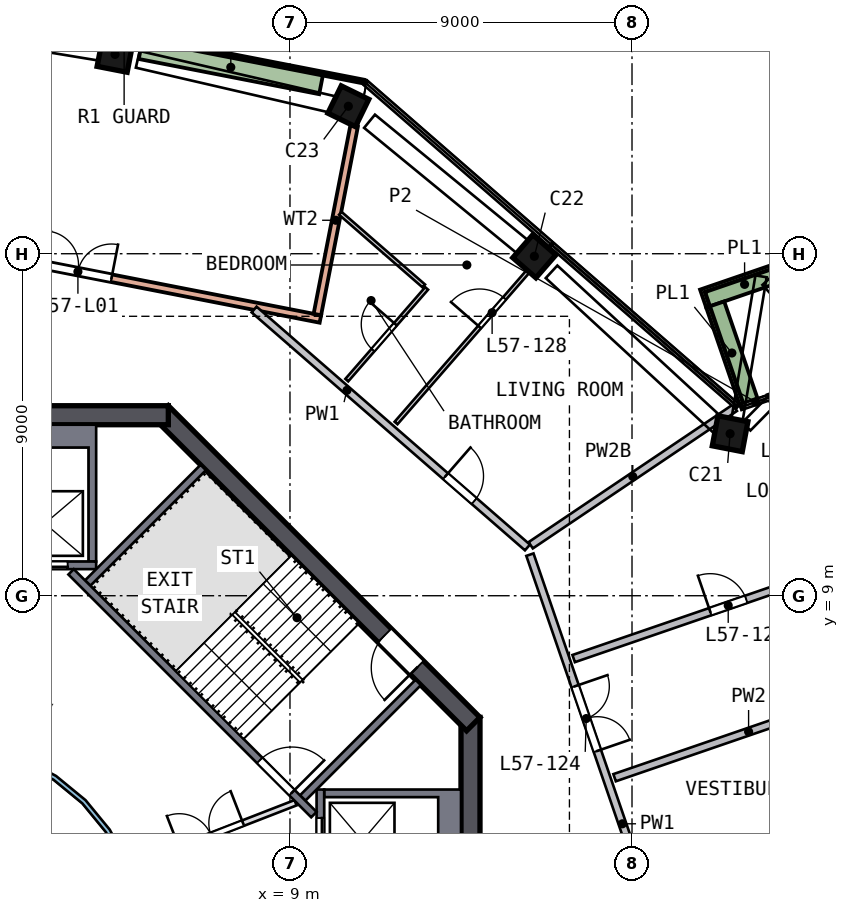
"""IFC4 building model, lengths in metres.
Left out: names, types, materials, properties, quantities, classifications, styles, units other than length and angle.
Written with IfcOpenShell. Run it as: python <this file> out.ifc"""

import sys

from ifc_helpers import new_model, si_unit, direction, frame, frame_2d, origin, origin_2d, place, context, subcontext, project, spatial, polyline, rectangle, outline, extrude, element, fill, save


model = new_model("IFC4")
c1 = context("Model", 3, precision=1e-05, world=origin(), true_north=direction((0.0, 1.0)))
c2 = subcontext(c1, "Body", "Model", "MODEL_VIEW")
j1 = project(units=[si_unit("LENGTHUNIT", "METRE"), si_unit("PLANEANGLEUNIT", "RADIAN")], contexts=[c1])
p1 = place(None, origin())
s1 = spatial("IfcSite", under=j1, at=p1, CompositionType="ELEMENT")
p2 = place(p1, origin())
s2 = spatial("IfcBuilding", under=s1, at=p2, CompositionType="ELEMENT")
p3 = place(p2, frame((0.0, 0.0, 234.0)))
s3 = spatial("IfcBuildingStorey", under=s2, at=p3, CompositionType="ELEMENT", Elevation=234.0)
p4 = place(p3, frame((20.658, 13.145, 0.0), z_axis=(-0.063244127, 0.09767873, 0.993206447), x_axis=(0.979494309, -0.184676163, 0.080533303)))
e1 = element("IfcColumn", 1, at=p4, inside=s3, PredefinedType="COLUMN", context=c2, shape_type="SweptSolid", body=[
    extrude(rectangle(XDim=0.8, YDim=0.8, at=origin_2d()), origin(), (0.0, 0.0, 1.0), 3.212),
])
p5 = place(p3, frame((15.534, 17.844, 0.0), z_axis=(-0.085478103, 0.073234353, 0.993644918), x_axis=(-0.749060992, 0.652869631, -0.112556101)))
e2 = element("IfcColumn", 2, at=p5, inside=s3, PredefinedType="COLUMN", context=c2, shape_type="SweptSolid", body=[
    extrude(rectangle(XDim=0.8, YDim=0.8, at=origin_2d()), origin(), (0.0, 0.0, 1.0), 3.21),
])
p6 = place(p3, frame((10.662, 21.821, 0.0), z_axis=(-0.104226063, 0.049870385, 0.993302508), x_axis=(0.892342905, -0.436319792, 0.115538643)))
e3 = element("IfcColumn", 3, at=p6, inside=s3, PredefinedType="COLUMN", context=c2, shape_type="SweptSolid", body=[
    extrude(rectangle(XDim=0.8, YDim=0.8, at=origin_2d()), origin(), (0.0, 0.0, 1.0), 3.211),
])
p7 = place(p3, frame((4.531, 23.22, 0.0), z_axis=(-0.110650124, 0.020609061, 0.99364572), x_axis=(-0.975267855, 0.190224415, -0.112549024)))
e4 = element("IfcColumn", 4, at=p7, inside=s3, PredefinedType="COLUMN", context=c2, shape_type="SweptSolid", body=[
    extrude(rectangle(XDim=0.8, YDim=0.8, at=origin_2d()), origin(), (0.0, 0.0, 1.0), 3.21),
])
p8 = place(p3, frame((13.75, -5.799, 0.0), z_axis=(0.0, 0.0, 1.0), x_axis=(0.0, 1.0, 0.0)))
e5 = element("IfcWall", 5, at=p8, inside=s3, PredefinedType="SHEAR", context=c2, shape_type="SweptSolid", body=[
    extrude(rectangle(XDim=11.598, YDim=0.5, at=frame_2d((5.799, 0.0))), origin(), (0.0, 0.0, 1.0), 3.5),
])
p9 = place(p8, frame((4.899, 0.0, 0.0)))
e6 = element("IfcOpeningElement", 6, at=p9, cuts=e5, PredefinedType="OPENING", context=c2, shape_type="SweptSolid", body=[
    extrude(rectangle(XDim=1.8, YDim=2.1, at=frame_2d((0.9, 1.05))), frame((0.0, 0.26, 0.0), z_axis=(0.0, -1.0, 0.0), x_axis=(1.0, 0.0, 0.0)), (0.0, 0.0, 1.0), 0.52),
])
p10 = place(p3, frame((13.823, 5.622, 0.0), z_axis=(0.0, 0.0, 1.0), x_axis=(-0.707106781, 0.707106781, 0.0)))
e7 = element("IfcWall", 7, at=p10, inside=s3, PredefinedType="SHEAR", context=c2, shape_type="SweptSolid", body=[
    extrude(rectangle(XDim=11.598, YDim=0.5, at=frame_2d((5.799, 0.0))), origin(), (0.0, 0.0, 1.0), 3.5),
])
p11 = place(p10, frame((2.099, 0.0, 0.0)))
e8 = element("IfcOpeningElement", 8, at=p11, cuts=e7, PredefinedType="OPENING", context=c2, shape_type="SweptSolid", body=[
    extrude(rectangle(XDim=1.2, YDim=2.1, at=frame_2d((0.6, 1.05))), frame((0.0, 0.26, 0.0), z_axis=(0.0, -1.0, 0.0), x_axis=(1.0, 0.0, 0.0)), (0.0, 0.0, 1.0), 0.52),
])
p12 = place(p3, frame((5.799, 13.75, 0.0), z_axis=(0.0, 0.0, 1.0), x_axis=(-1.0, 0.0, 0.0)))
e9 = element("IfcWall", 9, at=p12, inside=s3, PredefinedType="SHEAR", context=c2, shape_type="SweptSolid", body=[
    extrude(rectangle(XDim=11.598, YDim=0.5, at=frame_2d((5.799, 0.0))), origin(), (0.0, 0.0, 1.0), 3.5),
])
p13 = place(p12, frame((4.899, 0.0, 0.0)))
e10 = element("IfcOpeningElement", 10, at=p13, cuts=e9, PredefinedType="OPENING", context=c2, shape_type="SweptSolid", body=[
    extrude(rectangle(XDim=1.8, YDim=2.1, at=frame_2d((0.9, 1.05))), frame((0.0, 0.26, 0.0), z_axis=(0.0, -1.0, 0.0), x_axis=(1.0, 0.0, 0.0)), (0.0, 0.0, 1.0), 0.52),
])
p14 = place(p3, frame((23.301, 14.799, 0.0), z_axis=(0.0, 0.0, 1.0), x_axis=(-0.945712659, -0.325003949, 0.0)))
e11 = element("IfcWall", 11, at=p14, inside=s3, PredefinedType="SOLIDWALL", context=c2, shape_type="SweptSolid", body=[
    extrude(rectangle(XDim=1.8, YDim=0.15, at=frame_2d((0.9, 0.0))), origin(), (0.0, 0.0, 1.0), 2.525),
])
p15 = place(p14, frame((0.4, 0.0, 0.0)))
e12 = element("IfcOpeningElement", 12, at=p15, cuts=e11, PredefinedType="OPENING", context=c2, shape_type="SweptSolid", body=[
    extrude(rectangle(XDim=1.0, YDim=2.4, at=frame_2d((0.5, 1.2))), frame((0.0, 0.085, 0.0), z_axis=(0.0, -1.0, 0.0), x_axis=(1.0, 0.0, 0.0)), (0.0, 0.0, 1.0), 0.17),
])
p16 = place(p3, frame((22.053, 17.568, 0.0), z_axis=(0.0, 0.0, 1.0), x_axis=(-0.945764873, -0.324851975, 0.0)))
e13 = element("IfcWall", 13, at=p16, inside=s3, PredefinedType="SOLIDWALL", context=c2, shape_type="SweptSolid", body=[
    extrude(rectangle(XDim=2.306, YDim=0.5, at=frame_2d((1.153, 0.0))), origin(), (0.0, 0.0, 1.0), 0.7),
])
p17 = place(p3, frame((20.189, 16.664, 0.0), z_axis=(0.0, 0.0, 1.0), x_axis=(0.324925551, -0.945739598, 0.0)))
e14 = element("IfcWall", 14, at=p17, inside=s3, PredefinedType="SOLIDWALL", context=c2, shape_type="SweptSolid", body=[
    extrude(rectangle(XDim=2.699, YDim=0.5, at=frame_2d((1.35, 0.0))), origin(), (0.0, 0.0, 1.0), 0.7),
])
p18 = place(p3, frame((-2.96, 18.772, 0.0), z_axis=(0.0, 0.0, 1.0), x_axis=(0.981496446, -0.191480354, 0.0)))
e15 = element("IfcWall", 15, at=p18, inside=s3, PredefinedType="SOLIDWALL", context=c2, shape_type="SweptSolid", body=[
    extrude(rectangle(XDim=13.0, YDim=0.2, at=frame_2d((6.5, 0.0))), origin(), (0.0, 0.0, 1.0), 3.19),
])
p19 = place(p18, frame((5.6, 0.0, 0.0)))
e16 = element("IfcOpeningElement", 16, at=p19, cuts=e15, PredefinedType="OPENING", context=c2, shape_type="SweptSolid", body=[
    extrude(rectangle(XDim=1.8, YDim=2.4, at=frame_2d((0.9, 1.2))), frame((0.0, 0.11, 0.0), z_axis=(0.0, -1.0, 0.0), x_axis=(1.0, 0.0, 0.0)), (0.0, 0.0, 1.0), 0.22),
])
p20 = place(p3, frame((10.688, 21.361, 0.0), z_axis=(0.0, 0.0, 1.0), x_axis=(-0.191496739, -0.98149325, 0.0)))
e17 = element("IfcWall", 17, at=p20, inside=s3, PredefinedType="SOLIDWALL", context=c2, shape_type="SweptSolid", body=[
    extrude(rectangle(XDim=5.054, YDim=0.2, at=frame_2d((2.527, 0.0))), origin(), (0.0, 0.0, 1.0), 3.19),
])
p21 = place(p3, frame((10.937, 22.531, 0.0), z_axis=(0.0, 0.0, 1.0), x_axis=(-0.981494863, 0.191488469, 0.0)))
e18 = element("IfcWall", 18, at=p21, inside=s3, PredefinedType="SOLIDWALL", context=c2, shape_type="SweptSolid", body=[
    extrude(rectangle(XDim=12.84, YDim=0.1, at=frame_2d((6.42, 0.0))), origin(), (0.0, 0.0, 1.0), 0.7),
])
p22 = place(p3, frame((9.816, 22.444, 0.0), z_axis=(0.0, 0.0, 1.0), x_axis=(-0.981490129, 0.191512731, 0.0)))
e19 = element("IfcWall", 19, at=p22, inside=s3, PredefinedType="SOLIDWALL", context=c2, shape_type="SweptSolid", body=[
    extrude(rectangle(XDim=4.837, YDim=0.5, at=frame_2d((2.418, 0.0))), origin(), (0.0, 0.0, 1.0), 0.7),
])
p23 = place(p3, origin())
e20 = element("IfcWall", 20, at=p23, inside=s3, PredefinedType="SOLIDWALL", context=c2, shape_type="SweptSolid", body=[
    extrude(outline(polyline([(13.5, 3.9), (13.5, 1.2), (9.9, 1.2), (9.9, 1.4), (12.9, 1.4), (12.9, 3.7), (9.9, 3.7), (9.9, 3.9), (13.5, 3.9)])), origin(), (0.0, 0.0, 1.0), 3.19),
])
p24 = place(p3, frame((9.8, 1.2, 0.0), z_axis=(0.0, 0.0, 1.0), x_axis=(0.0, 1.0, 0.0)))
e21 = element("IfcWall", 21, at=p24, inside=s3, PredefinedType="SOLIDWALL", context=c2, shape_type="SweptSolid", body=[
    extrude(rectangle(XDim=2.7, YDim=0.2, at=frame_2d((1.35, 0.0))), origin(), (0.0, 0.0, 1.0), 3.19),
])
p25 = place(p24, frame((0.75, 0.0, 0.0)))
e22 = element("IfcOpeningElement", 22, at=p25, cuts=e21, PredefinedType="OPENING", context=c2, shape_type="SweptSolid", body=[
    extrude(rectangle(XDim=1.2, YDim=2.1, at=frame_2d((0.6, 1.05))), frame((0.0, 0.11, 0.0), z_axis=(0.0, -1.0, 0.0), x_axis=(1.0, 0.0, 0.0)), (0.0, 0.0, 1.0), 0.22),
])
p26 = place(p3, origin())
e23 = element("IfcWall", 23, at=p26, inside=s3, PredefinedType="SOLIDWALL", context=c2, shape_type="SweptSolid", body=[
    extrude(outline(polyline([(3.9, 9.9), (3.7, 9.9), (3.7, 12.9), (1.4, 12.9), (1.4, 9.9), (1.2, 9.9), (1.2, 13.5), (3.9, 13.5), (3.9, 9.9)])), origin(), (0.0, 0.0, 1.0), 3.19),
])
p27 = place(p3, frame((1.2, 9.8, 0.0), z_axis=(0.0, 0.0, 1.0), x_axis=(1.0, 0.0, 0.0)))
e24 = element("IfcWall", 24, at=p27, inside=s3, PredefinedType="SOLIDWALL", context=c2, shape_type="SweptSolid", body=[
    extrude(rectangle(XDim=2.7, YDim=0.2, at=frame_2d((1.35, 0.0))), origin(), (0.0, 0.0, 1.0), 3.19),
])
p28 = place(p27, frame((0.75, 0.0, 0.0)))
e25 = element("IfcOpeningElement", 25, at=p28, cuts=e24, PredefinedType="OPENING", context=c2, shape_type="SweptSolid", body=[
    extrude(rectangle(XDim=1.2, YDim=2.1, at=frame_2d((0.6, 1.05))), frame((0.0, 0.11, 0.0), z_axis=(0.0, -1.0, 0.0), x_axis=(1.0, 0.0, 0.0)), (0.0, 0.0, 1.0), 0.22),
])
p29 = place(p3, frame((3.24, 9.629, 0.0), z_axis=(0.0, 0.0, 1.0), x_axis=(0.707106781, -0.707106781, 0.0)))
e26 = element("IfcWall", 26, at=p29, inside=s3, PredefinedType="SOLIDWALL", context=c2, shape_type="SweptSolid", body=[
    extrude(rectangle(XDim=9.036, YDim=0.2, at=frame_2d((4.518, 0.0))), origin(), (0.0, 0.0, 1.0), 3.19),
])
p30 = place(p29, frame((7.018, 0.0, 0.0)))
e27 = element("IfcOpeningElement", 27, at=p30, cuts=e26, PredefinedType="OPENING", context=c2, shape_type="SweptSolid", body=[
    extrude(rectangle(XDim=1.2, YDim=2.1, at=frame_2d((0.6, 1.05))), frame((0.0, 0.11, 0.0), z_axis=(0.0, -1.0, 0.0), x_axis=(1.0, 0.0, 0.0)), (0.0, 0.0, 1.0), 0.22),
])
for number, where, z_axis, x_axis in (
    (28, (9.334, 3.677, 0.0), (0.0, 0.0, 1.0), (0.707, 0.707, 0.0)),
    (29, (3.677, 9.334, 0.0), (0.0, 0.0, 1.0), (0.707, 0.707, 0.0)),
):
    element("IfcWall", number, at=place(p3, frame(where, z_axis=z_axis, x_axis=x_axis)), inside=s3, PredefinedType="SOLIDWALL", context=c2, shape_type="SweptSolid", body=[
        extrude(rectangle(XDim=4.3, YDim=0.2, at=frame_2d((2.15, 0.0))), origin(), (0.0, 0.0, 1.0), 3.19),
    ])
p31 = place(p3, frame((4.782, 1.857, 0.0), z_axis=(0.0, 0.0, 1.0), x_axis=(0.932155279, 0.362058746, 0.0)))
e30 = element("IfcWall", 30, at=p31, inside=s3, PredefinedType="PARTITIONING", context=c2, shape_type="SweptSolid", body=[
    extrude(rectangle(XDim=4.682, YDim=0.15, at=frame_2d((2.341, 0.0))), origin(), (0.0, 0.0, 1.0), 3.19),
])
p32 = place(p31, frame((1.4, 0.0, 0.0)))
e31 = element("IfcOpeningElement", 31, at=p32, cuts=e30, PredefinedType="OPENING", context=c2, shape_type="SweptSolid", body=[
    extrude(rectangle(XDim=1.8, YDim=2.1, at=frame_2d((0.9, 1.05))), frame((0.0, 0.085, 0.0), z_axis=(0.0, -1.0, 0.0), x_axis=(1.0, 0.0, 0.0)), (0.0, 0.0, 1.0), 0.17),
])
p33 = place(p3, origin())
e32 = element("IfcWall", 32, at=p33, inside=s3, PredefinedType="SOLIDWALL", context=c2, shape_type="SweptSolid", body=[
    extrude(outline(polyline([(5.021, -0.999), (4.73, -1.959), (4.257, -2.844), (3.62, -3.62), (2.844, -4.257), (1.959, -4.73), (0.999, -5.021), (0.0, -5.12), (-0.999, -5.021), (-1.959, -4.73), (-2.844, -4.257), (-3.62, -3.62), (-4.257, -2.844), (-4.73, -1.959), (-5.021, -0.999), (-5.12, 0.0), (-5.021, 0.999), (-4.73, 1.959), (-4.257, 2.844), (-3.62, 3.62), (-2.844, 4.257), (-1.959, 4.73), (-0.999, 5.021), (0.0, 5.12), (0.999, 5.021), (1.959, 4.73), (2.844, 4.257), (3.62, 3.62), (4.257, 2.844), (4.73, 1.959), (5.021, 0.999), (5.12, 0.0), (5.021, -0.999)]), holes=[polyline([(4.904, 0.976), (4.619, 1.913), (4.157, 2.778), (3.535, 3.535), (2.778, 4.157), (1.913, 4.619), (0.976, 4.904), (0.0, 5.0), (-0.976, 4.904), (-1.913, 4.619), (-2.778, 4.157), (-3.535, 3.535), (-4.157, 2.778), (-4.619, 1.913), (-4.904, 0.976), (-5.0, 0.0), (-4.904, -0.976), (-4.619, -1.913), (-4.157, -2.778), (-3.535, -3.535), (-2.778, -4.157), (-1.913, -4.619), (-0.976, -4.904), (0.0, -5.0), (0.976, -4.904), (1.913, -4.619), (2.778, -4.157), (3.535, -3.535), (4.157, -2.778), (4.619, -1.913), (4.904, -0.976), (5.0, 0.0), (4.904, 0.976)])]), origin(), (0.0, 0.0, 1.0), 3.19),
])
p34 = place(p3, frame((8.056, 16.531, 0.0), z_axis=(0.0, 0.0, 1.0), x_axis=(0.754252127, -0.656584899, 0.0)))
e33 = element("IfcWall", 33, at=p34, inside=s3, PredefinedType="SOLIDWALL", context=c2, shape_type="SweptSolid", body=[
    extrude(rectangle(XDim=9.536, YDim=0.2, at=frame_2d((4.768, 0.0))), origin(), (0.0, 0.0, 1.0), 3.19),
])
p35 = place(p34, frame((6.678, 0.0, 0.0)))
e34 = element("IfcOpeningElement", 34, at=p35, cuts=e33, PredefinedType="OPENING", context=c2, shape_type="SweptSolid", body=[
    extrude(rectangle(XDim=1.0, YDim=2.1, at=frame_2d((0.5, 1.05))), frame((0.0, 0.11, 0.0), z_axis=(0.0, -1.0, 0.0), x_axis=(1.0, 0.0, 0.0)), (0.0, 0.0, 1.0), 0.22),
])
p36 = place(p3, frame((15.314, 10.081, 0.0), z_axis=(0.0, 0.0, 1.0), x_axis=(0.324917178, -0.945742474, 0.0)))
e35 = element("IfcWall", 35, at=p36, inside=s3, PredefinedType="SOLIDWALL", context=c2, shape_type="SweptSolid", body=[
    extrude(rectangle(XDim=9.316, YDim=0.2, at=frame_2d((4.658, 0.0))), origin(), (0.0, 0.0, 1.0), 3.19),
])
p37 = place(p36, frame((3.66, 0.0, 0.0)))
e36 = element("IfcOpeningElement", 36, at=p37, cuts=e35, PredefinedType="OPENING", context=c2, shape_type="SweptSolid", body=[
    extrude(rectangle(XDim=1.8, YDim=2.1, at=frame_2d((0.9, 1.05))), frame((0.0, 0.11, 0.0), z_axis=(0.0, -1.0, 0.0), x_axis=(1.0, 0.0, 0.0)), (0.0, 0.0, 1.0), 0.22),
])
p38 = place(p3, frame((15.335, 10.328, 0.0), z_axis=(0.0, 0.0, 1.0), x_axis=(0.829425163, 0.558617847, 0.0)))
e37 = element("IfcWall", 37, at=p38, inside=s3, PredefinedType="SOLIDWALL", context=c2, shape_type="SweptSolid", body=[
    extrude(rectangle(XDim=6.476, YDim=0.2, at=frame_2d((3.238, 0.0))), origin(), (0.0, 0.0, 1.0), 2.69),
])
p39 = place(p3, frame((16.465, 7.346, 0.0), z_axis=(0.0, 0.0, 1.0), x_axis=(0.945742436, 0.324917289, 0.0)))
e38 = element("IfcWall", 38, at=p39, inside=s3, PredefinedType="SOLIDWALL", context=c2, shape_type="SweptSolid", body=[
    extrude(rectangle(XDim=12.557, YDim=0.2, at=frame_2d((6.278, 0.0))), origin(), (0.0, 0.0, 1.0), 3.19),
])
p40 = place(p39, frame((3.8, 0.0, 0.0)))
e39 = element("IfcOpeningElement", 39, at=p40, cuts=e38, PredefinedType="OPENING", context=c2, shape_type="SweptSolid", body=[
    extrude(rectangle(XDim=1.0, YDim=2.1, at=frame_2d((0.5, 1.05))), frame((0.0, 0.11, 0.0), z_axis=(0.0, -1.0, 0.0), x_axis=(1.0, 0.0, 0.0)), (0.0, 0.0, 1.0), 0.22),
])
p41 = place(p3, frame((29.417, 8.291, 0.0), z_axis=(0.0, 0.0, 1.0), x_axis=(-0.945748411, -0.324899898, 0.0)))
e40 = element("IfcWall", 40, at=p41, inside=s3, PredefinedType="SOLIDWALL", context=c2, shape_type="SweptSolid", body=[
    extrude(rectangle(XDim=12.556, YDim=0.2, at=frame_2d((6.278, 0.0))), origin(), (0.0, 0.0, 1.0), 3.19),
])
p42 = place(p41, frame((3.9, 0.0, 0.0)))
e41 = element("IfcOpeningElement", 41, at=p42, cuts=e40, PredefinedType="OPENING", context=c2, shape_type="SweptSolid", body=[
    extrude(rectangle(XDim=1.0, YDim=2.1, at=frame_2d((0.5, 1.05))), frame((0.0, 0.11, 0.0), z_axis=(0.0, -1.0, 0.0), x_axis=(1.0, 0.0, 0.0)), (0.0, 0.0, 1.0), 0.22),
])
p43 = place(p3, frame((12.521, 17.153, 0.0), z_axis=(0.0, 0.0, 1.0), x_axis=(-0.754257045, 0.656579249, 0.0)))
e42 = element("IfcWall", 42, at=p43, inside=s3, PredefinedType="PARTITIONING", context=c2, shape_type="SweptSolid", body=[
    extrude(rectangle(XDim=2.912, YDim=0.1, at=frame_2d((1.456, 0.0))), origin(), (0.0, 0.0, 1.0), 3.19),
])
p44 = place(p3, frame((10.495, 14.673, 0.0), z_axis=(0.0, 0.0, 1.0), x_axis=(0.656590394, 0.754247343, 0.0)))
e43 = element("IfcWall", 43, at=p44, inside=s3, PredefinedType="PARTITIONING", context=c2, shape_type="SweptSolid", body=[
    extrude(rectangle(XDim=3.2, YDim=0.1, at=frame_2d((1.6, 0.0))), origin(), (0.0, 0.0, 1.0), 3.19),
])
p45 = place(p44, frame((1.05, 0.0, 0.0)))
e44 = element("IfcOpeningElement", 44, at=p45, cuts=e43, PredefinedType="OPENING", context=c2, shape_type="SweptSolid", body=[
    extrude(rectangle(XDim=0.9, YDim=2.1, at=frame_2d((0.45, 1.05))), frame((0.0, 0.06, 0.0), z_axis=(0.0, -1.0, 0.0), x_axis=(1.0, 0.0, 0.0)), (0.0, 0.0, 1.0), 0.12),
])
p46 = place(p3, frame((11.791, 13.545, 0.0), z_axis=(0.0, 0.0, 1.0), x_axis=(0.656588475, 0.754249014, 0.0)))
e45 = element("IfcWall", 45, at=p46, inside=s3, PredefinedType="PARTITIONING", context=c2, shape_type="SweptSolid", body=[
    extrude(rectangle(XDim=6.15, YDim=0.1, at=frame_2d((3.075, 0.0))), origin(), (0.0, 0.0, 1.0), 3.19),
])
p47 = place(p46, frame((3.35, 0.0, 0.0)))
e46 = element("IfcOpeningElement", 46, at=p47, cuts=e45, PredefinedType="OPENING", context=c2, shape_type="SweptSolid", body=[
    extrude(rectangle(XDim=1.0, YDim=2.1, at=frame_2d((0.5, 1.05))), frame((0.0, 0.06, 0.0), z_axis=(0.0, -1.0, 0.0), x_axis=(1.0, 0.0, 0.0)), (0.0, 0.0, 1.0), 0.12),
])
p48 = place(p19, origin())
e47 = element("IfcDoor", 47, at=p48, inside=s3, OperationType="DOUBLE_DOOR_SINGLE_SWING", PredefinedType="DOOR", context=c2, shape_type="SweptSolid", body=[
    extrude(rectangle(XDim=1.8, YDim=2.4, at=frame_2d((0.9, 1.2))), frame((0.0, 0.025, 0.0), z_axis=(0.0, -1.0, 0.0), x_axis=(1.0, 0.0, 0.0)), (0.0, 0.0, 1.0), 0.05),
])
fill(e16, e47)
p49 = place(p25, origin())
e48 = element("IfcDoor", 48, at=p49, inside=s3, OperationType="DOUBLE_DOOR_SLIDING", PredefinedType="DOOR", context=c2, shape_type="SweptSolid", body=[
    extrude(rectangle(XDim=1.2, YDim=2.1, at=frame_2d((0.6, 1.05))), frame((0.0, 0.025, 0.0), z_axis=(0.0, -1.0, 0.0), x_axis=(1.0, 0.0, 0.0)), (0.0, 0.0, 1.0), 0.05),
])
fill(e22, e48)
p50 = place(p28, origin())
e49 = element("IfcDoor", 49, at=p50, inside=s3, OperationType="DOUBLE_DOOR_SLIDING", PredefinedType="DOOR", context=c2, shape_type="SweptSolid", body=[
    extrude(rectangle(XDim=1.2, YDim=2.1, at=frame_2d((0.6, 1.05))), frame((0.0, 0.025, 0.0), z_axis=(0.0, -1.0, 0.0), x_axis=(1.0, 0.0, 0.0)), (0.0, 0.0, 1.0), 0.05),
])
fill(e25, e49)
p51 = place(p30, origin())
e50 = element("IfcDoor", 50, at=p51, inside=s3, OperationType="SINGLE_SWING_RIGHT", PredefinedType="DOOR", context=c2, shape_type="SweptSolid", body=[
    extrude(rectangle(XDim=1.2, YDim=2.1, at=frame_2d((0.6, 1.05))), frame((0.0, 0.025, 0.0), z_axis=(0.0, -1.0, 0.0), x_axis=(1.0, 0.0, 0.0)), (0.0, 0.0, 1.0), 0.05),
])
fill(e27, e50)
p52 = place(p11, origin())
e51 = element("IfcDoor", 51, at=p52, inside=s3, OperationType="SINGLE_SWING_LEFT", PredefinedType="DOOR", context=c2, shape_type="SweptSolid", body=[
    extrude(rectangle(XDim=1.2, YDim=2.1, at=frame_2d((0.6, 1.05))), frame((0.0, 0.025, 0.0), z_axis=(0.0, -1.0, 0.0), x_axis=(1.0, 0.0, 0.0)), (0.0, 0.0, 1.0), 0.05),
])
fill(e8, e51)
p53 = place(p32, origin())
e52 = element("IfcDoor", 52, at=p53, inside=s3, OperationType="DOUBLE_DOOR_SINGLE_SWING", PredefinedType="DOOR", context=c2, shape_type="SweptSolid", body=[
    extrude(rectangle(XDim=1.8, YDim=2.1, at=frame_2d((0.9, 1.05))), frame((0.0, 0.025, 0.0), z_axis=(0.0, -1.0, 0.0), x_axis=(1.0, 0.0, 0.0)), (0.0, 0.0, 1.0), 0.05),
])
fill(e31, e52)
p54 = place(p37, origin())
e53 = element("IfcDoor", 53, at=p54, inside=s3, OperationType="DOUBLE_DOOR_SINGLE_SWING", PredefinedType="DOOR", context=c2, shape_type="SweptSolid", body=[
    extrude(rectangle(XDim=1.8, YDim=2.1, at=frame_2d((0.9, 1.05))), frame((0.0, 0.025, 0.0), z_axis=(0.0, -1.0, 0.0), x_axis=(1.0, 0.0, 0.0)), (0.0, 0.0, 1.0), 0.05),
])
fill(e36, e53)
p55 = place(p40, origin())
e54 = element("IfcDoor", 54, at=p55, inside=s3, OperationType="SINGLE_SWING_LEFT", PredefinedType="DOOR", context=c2, shape_type="SweptSolid", body=[
    extrude(rectangle(XDim=1.0, YDim=2.1, at=frame_2d((0.5, 1.05))), frame((0.0, 0.025, 0.0), z_axis=(0.0, -1.0, 0.0), x_axis=(1.0, 0.0, 0.0)), (0.0, 0.0, 1.0), 0.05),
])
fill(e39, e54)
p56 = place(p35, origin())
e55 = element("IfcDoor", 55, at=p56, inside=s3, OperationType="SINGLE_SWING_LEFT", PredefinedType="DOOR", context=c2, shape_type="SweptSolid", body=[
    extrude(rectangle(XDim=1.0, YDim=2.1, at=frame_2d((0.5, 1.05))), frame((0.0, 0.025, 0.0), z_axis=(0.0, -1.0, 0.0), x_axis=(1.0, 0.0, 0.0)), (0.0, 0.0, 1.0), 0.05),
])
fill(e34, e55)
p57 = place(p47, origin())
e56 = element("IfcDoor", 56, at=p57, inside=s3, OperationType="SINGLE_SWING_LEFT", PredefinedType="DOOR", context=c2, shape_type="SweptSolid", body=[
    extrude(rectangle(XDim=1.0, YDim=2.1, at=frame_2d((0.5, 1.05))), frame((0.0, 0.025, 0.0), z_axis=(0.0, -1.0, 0.0), x_axis=(1.0, 0.0, 0.0)), (0.0, 0.0, 1.0), 0.05),
])
fill(e46, e56)
p58 = place(p45, origin())
e57 = element("IfcDoor", 57, at=p58, inside=s3, OperationType="SINGLE_SWING_RIGHT", PredefinedType="DOOR", context=c2, shape_type="SweptSolid", body=[
    extrude(rectangle(XDim=0.9, YDim=2.1, at=frame_2d((0.45, 1.05))), frame((0.0, 0.025, 0.0), z_axis=(0.0, -1.0, 0.0), x_axis=(1.0, 0.0, 0.0)), (0.0, 0.0, 1.0), 0.05),
])
fill(e44, e57)
save(model, sys.argv[1])
